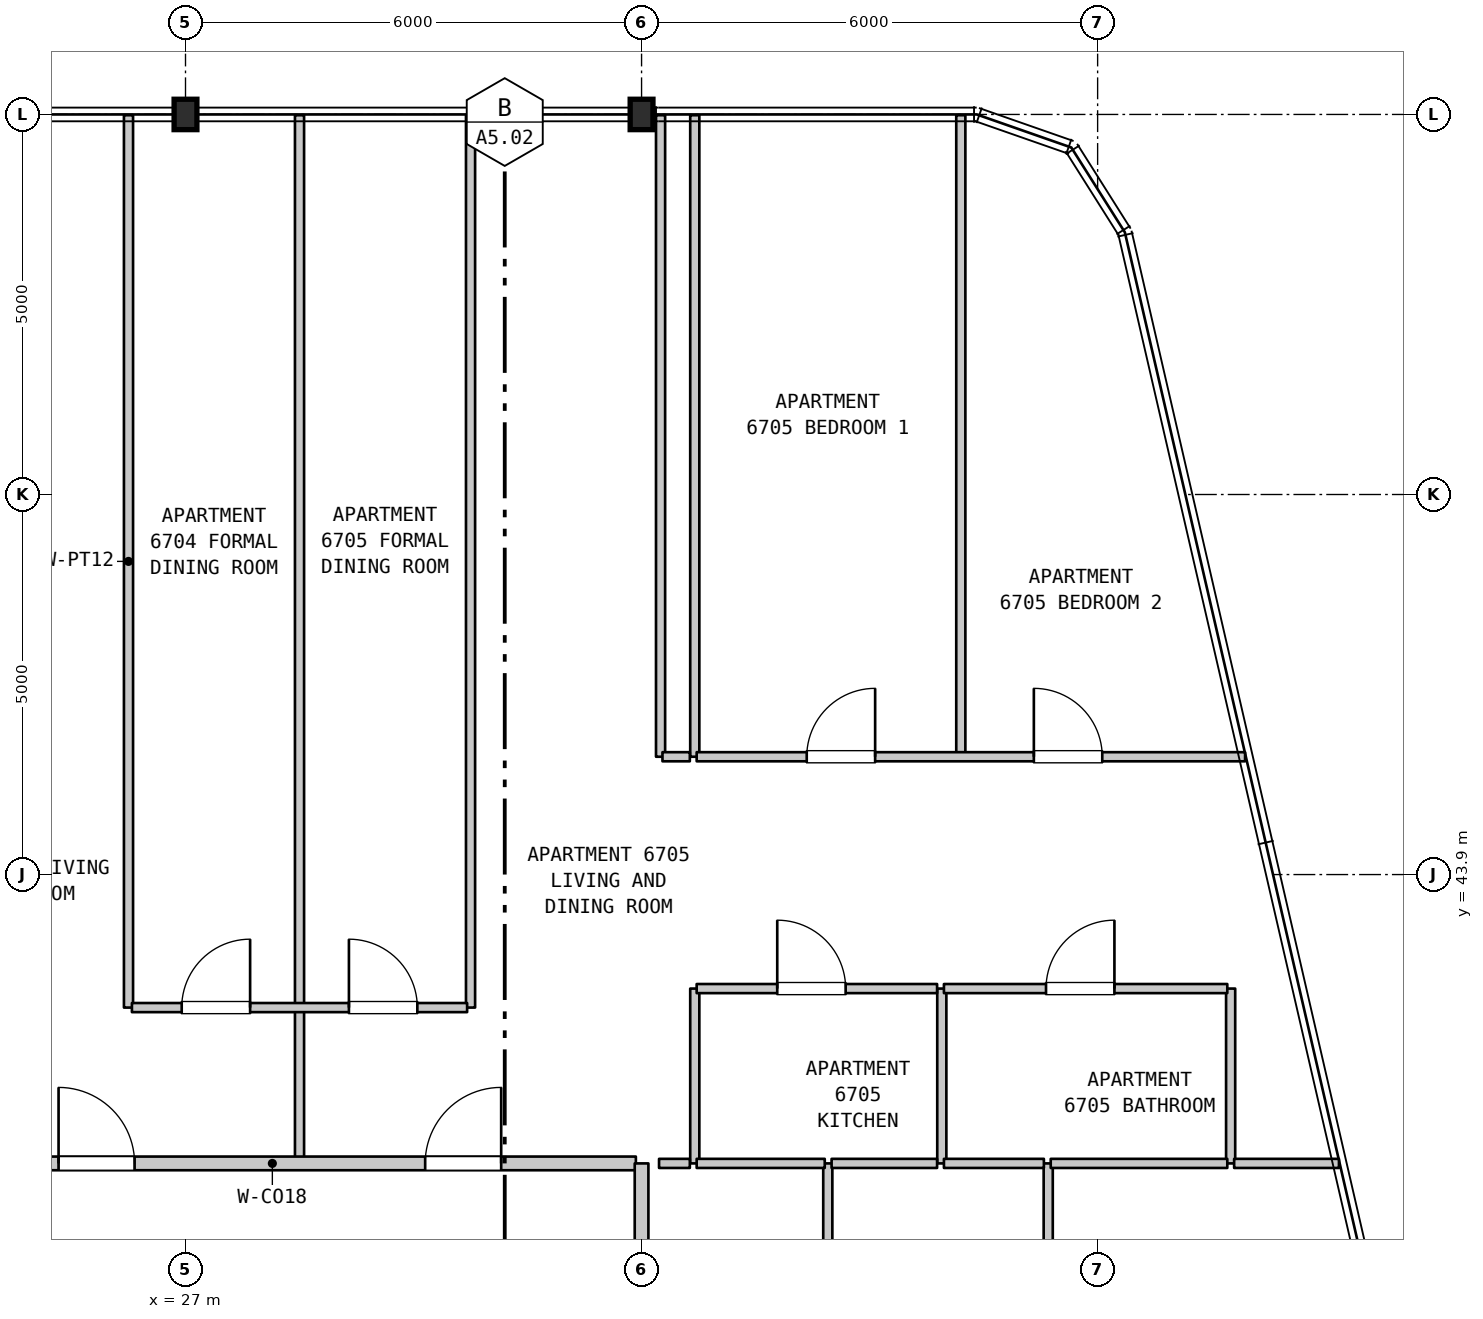
"""IFC4 building model, lengths in metres.
Left out: names, types, materials, properties, quantities, classifications, styles, units other than length and angle.
Written with IfcOpenShell. Run it as: python <this file> out.ifc"""

import sys

from ifc_helpers import new_model, si_unit, direction, frame, frame_2d, origin, origin_2d, place, context, subcontext, project, spatial, rectangle, i_section, extrude, element, fill, save


model = new_model("IFC4")
c1 = context("Model", 3, precision=1e-05, world=origin(), true_north=direction((0.0, 1.0)))
c2 = subcontext(c1, "Body", "Model", "MODEL_VIEW")
j1 = project(units=[si_unit("LENGTHUNIT", "METRE"), si_unit("PLANEANGLEUNIT", "RADIAN")], contexts=[c1])
p1 = place(None, origin())
s1 = spatial("IfcSite", under=j1, at=p1, CompositionType="ELEMENT")
p2 = place(p1, origin())
s2 = spatial("IfcBuilding", under=s1, at=p2, CompositionType="ELEMENT")
p3 = place(p2, frame((0.0, 0.0, 269.5)))
s3 = spatial("IfcBuildingStorey", under=s2, at=p3, CompositionType="ELEMENT", Elevation=269.5)
for number, where, z_axis, x_axis in (
    (1, (27.0, 53.9, 0.0), (0.0, 0.0, 1.0), (1.0, 0.0, 0.0)),
    (2, (33.0, 53.9, 0.0), (0.0, 0.0, 1.0), (1.0, 0.0, 0.0)),
):
    element("IfcColumn", number, at=place(p3, frame(where, z_axis=z_axis, x_axis=x_axis)), inside=s3, PredefinedType="COLUMN", context=c2, shape_type="SweptSolid", body=[
        extrude(i_section(OverallWidth=0.3, OverallDepth=0.4, WebThickness=0.013, FlangeThickness=0.024, FilletRadius=0.027, at=origin_2d()), origin(), (0.0, 0.0, 1.0), 3.7),
    ])
p4 = place(p3, frame((26.25, 42.15, 0.0), z_axis=(0.0, 0.0, 1.0), x_axis=(0.0, 1.0, 0.0)))
e3 = element("IfcWall", 3, at=p4, inside=s3, PredefinedType="PARTITIONING", context=c2, shape_type="SweptSolid", body=[
    extrude(rectangle(XDim=11.74, YDim=0.12, at=frame_2d((5.87, 0.0))), origin(), (0.0, 0.0, 1.0), 3.39),
])
p5 = place(p3, frame((28.5, 40.1, 0.0), z_axis=(0.0, 0.0, 1.0), x_axis=(0.0, 1.0, 0.0)))
e4 = element("IfcWall", 4, at=p5, inside=s3, PredefinedType="PARTITIONING", context=c2, shape_type="SweptSolid", body=[
    extrude(rectangle(XDim=2.05, YDim=0.12, at=frame_2d((1.025, 0.0))), origin(), (0.0, 0.0, 1.0), 3.39),
])
for number, where, z_axis, x_axis in (
    (5, (28.5, 42.15, 0.0), (0.0, 0.0, 1.0), (0.0, 1.0, 0.0)),
    (6, (30.75, 42.15, 0.0), (0.0, 0.0, 1.0), (0.0, 1.0, 0.0)),
):
    element("IfcWall", number, at=place(p3, frame(where, z_axis=z_axis, x_axis=x_axis)), inside=s3, PredefinedType="PARTITIONING", context=c2, shape_type="SweptSolid", body=[
        extrude(rectangle(XDim=11.74, YDim=0.12, at=frame_2d((5.87, 0.0))), origin(), (0.0, 0.0, 1.0), 3.39),
    ])
p6 = place(p3, frame((33.25, 45.45, 0.0), z_axis=(0.0, 0.0, 1.0), x_axis=(0.0, 1.0, 0.0)))
e7 = element("IfcWall", 7, at=p6, inside=s3, PredefinedType="PARTITIONING", context=c2, shape_type="SweptSolid", body=[
    extrude(rectangle(XDim=8.44, YDim=0.12, at=frame_2d((4.22, 0.0))), origin(), (0.0, 0.0, 1.0), 3.39),
])
p7 = place(p3, frame((33.7, 40.1, 0.0), z_axis=(0.0, 0.0, 1.0), x_axis=(0.0, 1.0, 0.0)))
e8 = element("IfcWall", 8, at=p7, inside=s3, PredefinedType="PARTITIONING", context=c2, shape_type="SweptSolid", body=[
    extrude(rectangle(XDim=2.3, YDim=0.12, at=frame_2d((1.15, 0.0))), origin(), (0.0, 0.0, 1.0), 3.39),
])
p8 = place(p3, frame((33.7, 45.45, 0.0), z_axis=(0.0, 0.0, 1.0), x_axis=(0.0, 1.0, 0.0)))
e9 = element("IfcWall", 9, at=p8, inside=s3, PredefinedType="PARTITIONING", context=c2, shape_type="SweptSolid", body=[
    extrude(rectangle(XDim=8.44, YDim=0.12, at=frame_2d((4.22, 0.0))), origin(), (0.0, 0.0, 1.0), 3.39),
])
p9 = place(p3, frame((35.45, 33.75, 0.0), z_axis=(0.0, 0.0, 1.0), x_axis=(0.0, 1.0, 0.0)))
e10 = element("IfcWall", 10, at=p9, inside=s3, PredefinedType="PARTITIONING", context=c2, shape_type="SweptSolid", body=[
    extrude(rectangle(XDim=6.35, YDim=0.12, at=frame_2d((3.175, 0.0))), origin(), (0.0, 0.0, 1.0), 3.39),
])
p10 = place(p3, frame((36.95, 40.1, 0.0), z_axis=(0.0, 0.0, 1.0), x_axis=(0.0, 1.0, 0.0)))
e11 = element("IfcWall", 11, at=p10, inside=s3, PredefinedType="PARTITIONING", context=c2, shape_type="SweptSolid", body=[
    extrude(rectangle(XDim=2.3, YDim=0.12, at=frame_2d((1.15, 0.0))), origin(), (0.0, 0.0, 1.0), 3.39),
])
p11 = place(p3, frame((37.2, 45.45, 0.0), z_axis=(0.0, 0.0, 1.0), x_axis=(0.0, 1.0, 0.0)))
e12 = element("IfcWall", 12, at=p11, inside=s3, PredefinedType="PARTITIONING", context=c2, shape_type="SweptSolid", body=[
    extrude(rectangle(XDim=8.44, YDim=0.12, at=frame_2d((4.22, 0.0))), origin(), (0.0, 0.0, 1.0), 3.39),
])
p12 = place(p3, frame((38.35, 33.75, 0.0), z_axis=(0.0, 0.0, 1.0), x_axis=(0.0, 1.0, 0.0)))
e13 = element("IfcWall", 13, at=p12, inside=s3, PredefinedType="PARTITIONING", context=c2, shape_type="SweptSolid", body=[
    extrude(rectangle(XDim=6.35, YDim=0.12, at=frame_2d((3.175, 0.0))), origin(), (0.0, 0.0, 1.0), 3.39),
])
p13 = place(p3, frame((40.75, 40.1, 0.0), z_axis=(0.0, 0.0, 1.0), x_axis=(0.0, 1.0, 0.0)))
e14 = element("IfcWall", 14, at=p13, inside=s3, PredefinedType="PARTITIONING", context=c2, shape_type="SweptSolid", body=[
    extrude(rectangle(XDim=2.3, YDim=0.12, at=frame_2d((1.15, 0.0))), origin(), (0.0, 0.0, 1.0), 3.39),
])
p14 = place(p3, frame((23.36, 40.1, 0.0), z_axis=(0.0, 0.0, 1.0), x_axis=(1.0, 0.0, 0.0)))
e15 = element("IfcWall", 15, at=p14, inside=s3, PredefinedType="STANDARD", context=c2, shape_type="SweptSolid", body=[
    extrude(rectangle(XDim=9.565, YDim=0.18, at=frame_2d((4.782, 0.0))), origin(), (0.0, 0.0, 1.0), 3.39),
])
p15 = place(p14, frame((1.97, 0.0, 0.0)))
e16 = element("IfcOpeningElement", 16, at=p15, cuts=e15, PredefinedType="OPENING", context=c2, shape_type="SweptSolid", body=[
    extrude(rectangle(XDim=1.0, YDim=2.15, at=frame_2d((0.5, 1.075))), frame((0.0, 0.1, 0.0), z_axis=(0.0, -1.0, 0.0), x_axis=(1.0, 0.0, 0.0)), (0.0, 0.0, 1.0), 0.2),
])
p16 = place(p14, frame((6.793, 0.0, 0.0)))
e17 = element("IfcOpeningElement", 17, at=p16, cuts=e15, PredefinedType="OPENING", context=c2, shape_type="SweptSolid", body=[
    extrude(rectangle(XDim=1.0, YDim=2.15, at=frame_2d((0.5, 1.075))), frame((0.0, 0.1, 0.0), z_axis=(0.0, -1.0, 0.0), x_axis=(1.0, 0.0, 0.0)), (0.0, 0.0, 1.0), 0.2),
])
p17 = place(p3, frame((33.23, 40.1, 0.0), z_axis=(0.0, 0.0, 1.0), x_axis=(1.0, 0.0, 0.0)))
e18 = element("IfcWall", 18, at=p17, inside=s3, PredefinedType="PARTITIONING", context=c2, shape_type="SweptSolid", body=[
    extrude(rectangle(XDim=0.405, YDim=0.12, at=frame_2d((0.203, 0.0))), origin(), (0.0, 0.0, 1.0), 3.39),
])
p18 = place(p3, frame((33.725, 40.1, 0.0), z_axis=(0.0, 0.0, 1.0), x_axis=(1.0, 0.0, 0.0)))
e19 = element("IfcWall", 19, at=p18, inside=s3, PredefinedType="PARTITIONING", context=c2, shape_type="SweptSolid", body=[
    extrude(rectangle(XDim=1.685, YDim=0.12, at=frame_2d((0.842, 0.0))), origin(), (0.0, 0.0, 1.0), 3.39),
])
p19 = place(p3, frame((35.5, 40.1, 0.0), z_axis=(0.0, 0.0, 1.0), x_axis=(1.0, 0.0, 0.0)))
e20 = element("IfcWall", 20, at=p19, inside=s3, PredefinedType="PARTITIONING", context=c2, shape_type="SweptSolid", body=[
    extrude(rectangle(XDim=1.388, YDim=0.12, at=frame_2d((0.694, 0.0))), origin(), (0.0, 0.0, 1.0), 3.39),
])
p20 = place(p3, frame((36.978, 40.1, 0.0), z_axis=(0.0, 0.0, 1.0), x_axis=(1.0, 0.0, 0.0)))
e21 = element("IfcWall", 21, at=p20, inside=s3, PredefinedType="PARTITIONING", context=c2, shape_type="SweptSolid", body=[
    extrude(rectangle(XDim=1.315, YDim=0.12, at=frame_2d((0.657, 0.0))), origin(), (0.0, 0.0, 1.0), 3.39),
])
p21 = place(p3, frame((38.383, 40.1, 0.0), z_axis=(0.0, 0.0, 1.0), x_axis=(1.0, 0.0, 0.0)))
e22 = element("IfcWall", 22, at=p21, inside=s3, PredefinedType="PARTITIONING", context=c2, shape_type="SweptSolid", body=[
    extrude(rectangle(XDim=2.323, YDim=0.12, at=frame_2d((1.162, 0.0))), origin(), (0.0, 0.0, 1.0), 3.39),
])
p22 = place(p3, frame((40.796, 40.1, 0.0), z_axis=(0.0, 0.0, 1.0), x_axis=(1.0, 0.0, 0.0)))
e23 = element("IfcWall", 23, at=p22, inside=s3, PredefinedType="PARTITIONING", context=c2, shape_type="SweptSolid", body=[
    extrude(rectangle(XDim=1.379, YDim=0.12, at=frame_2d((0.689, 0.0))), origin(), (0.0, 0.0, 1.0), 3.39),
])
p23 = place(p3, frame((26.295, 42.15, 0.0), z_axis=(0.0, 0.0, 1.0), x_axis=(1.0, 0.0, 0.0)))
e24 = element("IfcWall", 24, at=p23, inside=s3, PredefinedType="PARTITIONING", context=c2, shape_type="SweptSolid", body=[
    extrude(rectangle(XDim=4.41, YDim=0.12, at=frame_2d((2.205, 0.0))), origin(), (0.0, 0.0, 1.0), 3.39),
])
p24 = place(p23, frame((0.655, 0.0, 0.0)))
e25 = element("IfcOpeningElement", 25, at=p24, cuts=e24, PredefinedType="OPENING", context=c2, shape_type="SweptSolid", body=[
    extrude(rectangle(XDim=0.9, YDim=2.15, at=frame_2d((0.45, 1.075))), frame((0.0, 0.07, 0.0), z_axis=(0.0, -1.0, 0.0), x_axis=(1.0, 0.0, 0.0)), (0.0, 0.0, 1.0), 0.14),
])
p25 = place(p23, frame((2.855, 0.0, 0.0)))
e26 = element("IfcOpeningElement", 26, at=p25, cuts=e24, PredefinedType="OPENING", context=c2, shape_type="SweptSolid", body=[
    extrude(rectangle(XDim=0.9, YDim=2.15, at=frame_2d((0.45, 1.075))), frame((0.0, 0.07, 0.0), z_axis=(0.0, -1.0, 0.0), x_axis=(1.0, 0.0, 0.0)), (0.0, 0.0, 1.0), 0.14),
])
p26 = place(p3, frame((33.725, 42.4, 0.0), z_axis=(0.0, 0.0, 1.0), x_axis=(1.0, 0.0, 0.0)))
e27 = element("IfcWall", 27, at=p26, inside=s3, PredefinedType="PARTITIONING", context=c2, shape_type="SweptSolid", body=[
    extrude(rectangle(XDim=3.163, YDim=0.12, at=frame_2d((1.582, 0.0))), origin(), (0.0, 0.0, 1.0), 3.39),
])
p27 = place(p26, frame((1.06, 0.0, 0.0)))
e28 = element("IfcOpeningElement", 28, at=p27, cuts=e27, PredefinedType="OPENING", context=c2, shape_type="SweptSolid", body=[
    extrude(rectangle(XDim=0.9, YDim=2.15, at=frame_2d((0.45, 1.075))), frame((0.0, 0.07, 0.0), z_axis=(0.0, -1.0, 0.0), x_axis=(1.0, 0.0, 0.0)), (0.0, 0.0, 1.0), 0.14),
])
p28 = place(p3, frame((36.978, 42.4, 0.0), z_axis=(0.0, 0.0, 1.0), x_axis=(1.0, 0.0, 0.0)))
e29 = element("IfcWall", 29, at=p28, inside=s3, PredefinedType="PARTITIONING", context=c2, shape_type="SweptSolid", body=[
    extrude(rectangle(XDim=3.728, YDim=0.12, at=frame_2d((1.864, 0.0))), origin(), (0.0, 0.0, 1.0), 3.39),
])
p29 = place(p28, frame((1.343, 0.0, 0.0)))
e30 = element("IfcOpeningElement", 30, at=p29, cuts=e29, PredefinedType="OPENING", context=c2, shape_type="SweptSolid", body=[
    extrude(rectangle(XDim=0.9, YDim=2.1, at=frame_2d((0.45, 1.05))), frame((0.0, 0.07, 0.0), z_axis=(0.0, -1.0, 0.0), x_axis=(1.0, 0.0, 0.0)), (0.0, 0.0, 1.0), 0.14),
])
p30 = place(p3, frame((33.275, 45.45, 0.0), z_axis=(0.0, 0.0, 1.0), x_axis=(1.0, 0.0, 0.0)))
e31 = element("IfcWall", 31, at=p30, inside=s3, PredefinedType="PARTITIONING", context=c2, shape_type="SweptSolid", body=[
    extrude(rectangle(XDim=0.36, YDim=0.12, at=frame_2d((0.18, 0.0))), origin(), (0.0, 0.0, 1.0), 3.39),
])
p31 = place(p3, frame((33.725, 45.45, 0.0), z_axis=(0.0, 0.0, 1.0), x_axis=(1.0, 0.0, 0.0)))
e32 = element("IfcWall", 32, at=p31, inside=s3, PredefinedType="PARTITIONING", context=c2, shape_type="SweptSolid", body=[
    extrude(rectangle(XDim=7.215, YDim=0.12, at=frame_2d((3.607, 0.0))), origin(), (0.0, 0.0, 1.0), 3.39),
])
p32 = place(p31, frame((1.448, 0.0, 0.0)))
e33 = element("IfcOpeningElement", 33, at=p32, cuts=e32, PredefinedType="OPENING", context=c2, shape_type="SweptSolid", body=[
    extrude(rectangle(XDim=0.9, YDim=2.15, at=frame_2d((0.45, 1.075))), frame((0.0, 0.07, 0.0), z_axis=(0.0, -1.0, 0.0), x_axis=(1.0, 0.0, 0.0)), (0.0, 0.0, 1.0), 0.14),
])
p33 = place(p31, frame((4.436, 0.0, 0.0)))
e34 = element("IfcOpeningElement", 34, at=p33, cuts=e32, PredefinedType="OPENING", context=c2, shape_type="SweptSolid", body=[
    extrude(rectangle(XDim=0.9, YDim=2.15, at=frame_2d((0.45, 1.075))), frame((0.0, 0.07, 0.0), z_axis=(0.0, -1.0, 0.0), x_axis=(1.0, 0.0, 0.0)), (0.0, 0.0, 1.0), 0.14),
])
p34 = place(p3, frame((33.0, 37.9, 0.0), z_axis=(0.0, 0.0, 1.0), x_axis=(0.0, 1.0, 0.0)))
e35 = element("IfcWall", 35, at=p34, inside=s3, PredefinedType="STANDARD", context=c2, shape_type="SweptSolid", body=[
    extrude(rectangle(XDim=2.2, YDim=0.18, at=frame_2d((1.1, 0.0))), origin(), (0.0, 0.0, 1.0), 2.79),
])
p35 = place(p15, origin())
e36 = element("IfcDoor", 36, at=p35, inside=s3, OperationType="SINGLE_SWING_LEFT", PredefinedType="DOOR", context=c2, shape_type="SweptSolid", body=[
    extrude(rectangle(XDim=1.0, YDim=2.15, at=frame_2d((0.5, 1.075))), frame((0.0, 0.025, 0.0), z_axis=(0.0, -1.0, 0.0), x_axis=(1.0, 0.0, 0.0)), (0.0, 0.0, 1.0), 0.05),
])
fill(e16, e36)
p36 = place(p16, origin())
e37 = element("IfcDoor", 37, at=p36, inside=s3, OperationType="SINGLE_SWING_RIGHT", PredefinedType="DOOR", context=c2, shape_type="SweptSolid", body=[
    extrude(rectangle(XDim=1.0, YDim=2.15, at=frame_2d((0.5, 1.075))), frame((0.0, 0.025, 0.0), z_axis=(0.0, -1.0, 0.0), x_axis=(1.0, 0.0, 0.0)), (0.0, 0.0, 1.0), 0.05),
])
fill(e17, e37)
p37 = place(p24, origin())
e38 = element("IfcDoor", 38, at=p37, inside=s3, OperationType="SINGLE_SWING_RIGHT", PredefinedType="DOOR", context=c2, shape_type="SweptSolid", body=[
    extrude(rectangle(XDim=0.9, YDim=2.15, at=frame_2d((0.45, 1.075))), frame((0.0, 0.025, 0.0), z_axis=(0.0, -1.0, 0.0), x_axis=(1.0, 0.0, 0.0)), (0.0, 0.0, 1.0), 0.05),
])
fill(e25, e38)
p38 = place(p25, origin())
e39 = element("IfcDoor", 39, at=p38, inside=s3, OperationType="SINGLE_SWING_LEFT", PredefinedType="DOOR", context=c2, shape_type="SweptSolid", body=[
    extrude(rectangle(XDim=0.9, YDim=2.15, at=frame_2d((0.45, 1.075))), frame((0.0, 0.025, 0.0), z_axis=(0.0, -1.0, 0.0), x_axis=(1.0, 0.0, 0.0)), (0.0, 0.0, 1.0), 0.05),
])
fill(e26, e39)
p39 = place(p27, origin())
e40 = element("IfcDoor", 40, at=p39, inside=s3, OperationType="SINGLE_SWING_LEFT", PredefinedType="DOOR", context=c2, shape_type="SweptSolid", body=[
    extrude(rectangle(XDim=0.9, YDim=2.15, at=frame_2d((0.45, 1.075))), frame((0.0, 0.025, 0.0), z_axis=(0.0, -1.0, 0.0), x_axis=(1.0, 0.0, 0.0)), (0.0, 0.0, 1.0), 0.05),
])
fill(e28, e40)
p40 = place(p29, origin())
e41 = element("IfcDoor", 41, at=p40, inside=s3, OperationType="SINGLE_SWING_RIGHT", PredefinedType="DOOR", context=c2, shape_type="SweptSolid", body=[
    extrude(rectangle(XDim=0.9, YDim=2.1, at=frame_2d((0.45, 1.05))), frame((0.0, 0.025, 0.0), z_axis=(0.0, -1.0, 0.0), x_axis=(1.0, 0.0, 0.0)), (0.0, 0.0, 1.0), 0.05),
])
fill(e30, e41)
p41 = place(p32, origin())
e42 = element("IfcDoor", 42, at=p41, inside=s3, OperationType="SINGLE_SWING_RIGHT", PredefinedType="DOOR", context=c2, shape_type="SweptSolid", body=[
    extrude(rectangle(XDim=0.9, YDim=2.15, at=frame_2d((0.45, 1.075))), frame((0.0, 0.025, 0.0), z_axis=(0.0, -1.0, 0.0), x_axis=(1.0, 0.0, 0.0)), (0.0, 0.0, 1.0), 0.05),
])
fill(e33, e42)
p42 = place(p33, origin())
e43 = element("IfcDoor", 43, at=p42, inside=s3, OperationType="SINGLE_SWING_LEFT", PredefinedType="DOOR", context=c2, shape_type="SweptSolid", body=[
    extrude(rectangle(XDim=0.9, YDim=2.15, at=frame_2d((0.45, 1.075))), frame((0.0, 0.025, 0.0), z_axis=(0.0, -1.0, 0.0), x_axis=(1.0, 0.0, 0.0)), (0.0, 0.0, 1.0), 0.05),
])
fill(e34, e43)
save(model, sys.argv[1])
